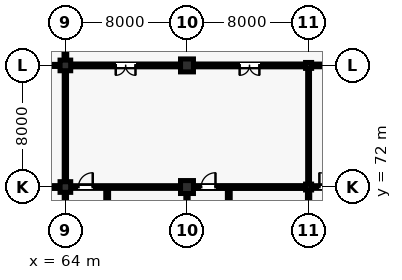
"""IFC4 building model, lengths in metres.
Left out: names, types, materials, properties, quantities, classifications, styles, units other than length and angle.
Written with IfcOpenShell. Run it as: python <this file> out.ifc"""

import sys

from ifc_helpers import new_model, si_unit, direction, frame, frame_2d, origin, origin_2d, place, context, subcontext, project, spatial, rectangle, i_section, extrude, element, fill, save


model = new_model("IFC4")
c1 = context("Model", 3, precision=1e-05, world=origin(), true_north=direction((0.0, 1.0)))
c2 = subcontext(c1, "Body", "Model", "MODEL_VIEW")
j1 = project(units=[si_unit("LENGTHUNIT", "METRE"), si_unit("PLANEANGLEUNIT", "RADIAN")], contexts=[c1])
p1 = place(None, origin())
s1 = spatial("IfcSite", under=j1, at=p1, CompositionType="ELEMENT")
p2 = place(p1, origin())
s2 = spatial("IfcBuilding", under=s1, at=p2, CompositionType="ELEMENT")
p3 = place(p2, origin())
s3 = spatial("IfcBuildingStorey", under=s2, at=p3, CompositionType="ELEMENT", Elevation=0.0)
for number, where, z_axis, x_axis in (
    (1, (64.0, 72.0, 0.0), (0.0, 0.0, 1.0), (1.0, 0.0, 0.0)),
    (2, (64.0, 80.0, 0.0), (0.0, 0.0, 1.0), (1.0, 0.0, 0.0)),
):
    element("IfcColumn", number, at=place(p3, frame(where, z_axis=z_axis, x_axis=x_axis)), inside=s3, PredefinedType="COLUMN", context=c2, shape_type="SweptSolid", body=[
        extrude(rectangle(XDim=0.7, YDim=0.7, at=origin_2d()), origin(), (0.0, 0.0, 1.0), 5.28),
    ])
for number, where, z_axis, x_axis in (
    (3, (72.0, 72.0, 0.0), (0.0, 0.0, 1.0), (1.0, 0.0, 0.0)),
    (4, (72.0, 80.0, 0.0), (0.0, 0.0, 1.0), (1.0, 0.0, 0.0)),
):
    element("IfcColumn", number, at=place(p3, frame(where, z_axis=z_axis, x_axis=x_axis)), inside=s3, PredefinedType="COLUMN", context=c2, shape_type="SweptSolid", body=[
        extrude(rectangle(XDim=0.85, YDim=0.85, at=origin_2d()), origin(), (0.0, 0.0, 1.0), 5.28),
    ])
for number, where, z_axis, x_axis in (
    (5, (80.0, 72.0, 0.0), (0.0, 0.0, 1.0), (1.0, 0.0, 0.0)),
    (6, (80.0, 80.0, 0.0), (0.0, 0.0, 1.0), (1.0, 0.0, 0.0)),
):
    element("IfcColumn", number, at=place(p3, frame(where, z_axis=z_axis, x_axis=x_axis)), inside=s3, PredefinedType="COLUMN", context=c2, shape_type="SweptSolid", body=[
        extrude(i_section(OverallWidth=0.398, OverallDepth=0.387, WebThickness=0.021, FlangeThickness=0.033, FilletRadius=0.015, at=origin_2d()), origin(), (0.0, 0.0, 1.0), 5.28),
    ])
p4 = place(p3, frame((64.0, 66.75, 0.0), z_axis=(0.0, 0.0, 1.0), x_axis=(0.0, 1.0, 0.0)))
e7 = element("IfcWall", 7, at=p4, inside=s3, PredefinedType="PARTITIONING", context=c2, shape_type="SweptSolid", body=[
    extrude(rectangle(XDim=4.89, YDim=0.15, at=frame_2d((2.445, 0.0))), origin(), (0.0, 0.0, 1.0), 4.403),
])
p5 = place(p3, frame((66.75, 66.7, 0.0), z_axis=(0.0, 0.0, 1.0), x_axis=(0.0, 1.0, 0.0)))
e8 = element("IfcWall", 8, at=p5, inside=s3, PredefinedType="PARTITIONING", context=c2, shape_type="SweptSolid", body=[
    extrude(rectangle(XDim=5.28, YDim=0.185, at=frame_2d((2.64, 0.0))), origin(), (0.0, 0.0, 1.0), 4.403),
])
p6 = place(p3, frame((72.0, 66.75, 0.0), z_axis=(0.0, 0.0, 1.0), x_axis=(0.0, 1.0, 0.0)))
e9 = element("IfcWall", 9, at=p6, inside=s3, PredefinedType="PARTITIONING", context=c2, shape_type="SweptSolid", body=[
    extrude(rectangle(XDim=4.815, YDim=0.15, at=frame_2d((2.407, 0.0))), origin(), (0.0, 0.0, 1.0), 4.412),
])
p7 = place(p3, frame((74.75, 66.7, 0.0), z_axis=(0.0, 0.0, 1.0), x_axis=(0.0, 1.0, 0.0)))
e10 = element("IfcWall", 10, at=p7, inside=s3, PredefinedType="PARTITIONING", context=c2, shape_type="SweptSolid", body=[
    extrude(rectangle(XDim=5.28, YDim=0.185, at=frame_2d((2.64, 0.0))), origin(), (0.0, 0.0, 1.0), 4.336),
])
p8 = place(p3, frame((80.0, 66.75, 0.0), z_axis=(0.0, 0.0, 1.0), x_axis=(0.0, 1.0, 0.0)))
e11 = element("IfcWall", 11, at=p8, inside=s3, PredefinedType="PARTITIONING", context=c2, shape_type="SweptSolid", body=[
    extrude(rectangle(XDim=5.046, YDim=0.15, at=frame_2d((2.523, 0.0))), origin(), (0.0, 0.0, 1.0), 4.404),
])
p9 = place(p3, frame((56.34, 72.0, 0.0), z_axis=(0.0, 0.0, 1.0), x_axis=(1.0, 0.0, 0.0)))
e12 = element("IfcWall", 12, at=p9, inside=s3, PredefinedType="PARTITIONING", context=c2, shape_type="SweptSolid", body=[
    extrude(rectangle(XDim=7.32, YDim=0.185, at=frame_2d((3.66, 0.0))), origin(), (0.0, 0.0, 1.0), 4.327),
])
p10 = place(p9, frame((0.52, 0.0, 0.0)))
e13 = element("IfcOpeningElement", 13, at=p10, cuts=e12, PredefinedType="OPENING", context=c2, shape_type="SweptSolid", body=[
    extrude(rectangle(XDim=0.94, YDim=2.12, at=frame_2d((0.47, 1.06))), frame((0.0, 0.103, 0.0), z_axis=(0.0, -1.0, 0.0), x_axis=(1.0, 0.0, 0.0)), (0.0, 0.0, 1.0), 0.205),
])
p11 = place(p3, frame((64.0, 72.34, 0.0), z_axis=(0.0, 0.0, 1.0), x_axis=(0.0, 1.0, 0.0)))
e14 = element("IfcWall", 14, at=p11, inside=s3, PredefinedType="PARTITIONING", context=c2, shape_type="SweptSolid", body=[
    extrude(rectangle(XDim=7.32, YDim=0.15, at=frame_2d((3.66, 0.0))), origin(), (0.0, 0.0, 1.0), 4.412),
])
p12 = place(p3, frame((56.0, 80.0, 0.0), z_axis=(0.0, 0.0, 1.0), x_axis=(1.0, 0.0, 0.0)))
e15 = element("IfcWall", 15, at=p12, inside=s3, PredefinedType="PARTITIONING", context=c2, shape_type="SweptSolid", body=[
    extrude(rectangle(XDim=7.66, YDim=0.135, at=frame_2d((3.83, 0.0))), origin(), (0.0, 0.0, 1.0), 5.025),
])
p13 = place(p3, frame((64.0, 80.34, 0.0), z_axis=(0.0, 0.0, 1.0), x_axis=(0.0, 1.0, 0.0)))
e16 = element("IfcWall", 16, at=p13, inside=s3, PredefinedType="PARTITIONING", context=c2, shape_type="SweptSolid", body=[
    extrude(rectangle(XDim=7.66, YDim=0.175, at=frame_2d((3.83, 0.0))), origin(), (0.0, 0.0, 1.0), 5.025),
])
p14 = place(p13, frame((3.305, 0.0, 0.0)))
e17 = element("IfcOpeningElement", 17, at=p14, cuts=e16, PredefinedType="OPENING", context=c2, shape_type="SweptSolid", body=[
    extrude(rectangle(XDim=1.05, YDim=2.15, at=frame_2d((0.525, 1.075))), frame((0.0, 0.097, 0.0), z_axis=(0.0, -1.0, 0.0), x_axis=(1.0, 0.0, 0.0)), (0.0, 0.0, 1.0), 0.195),
])
p15 = place(p3, frame((64.34, 72.0, 0.0), z_axis=(0.0, 0.0, 1.0), x_axis=(1.0, 0.0, 0.0)))
e18 = element("IfcWall", 18, at=p15, inside=s3, PredefinedType="PARTITIONING", context=c2, shape_type="SweptSolid", body=[
    extrude(rectangle(XDim=7.245, YDim=0.175, at=frame_2d((3.623, 0.0))), origin(), (0.0, 0.0, 1.0), 4.403),
])
p16 = place(p15, frame((0.52, 0.0, 0.0)))
e19 = element("IfcOpeningElement", 19, at=p16, cuts=e18, PredefinedType="OPENING", context=c2, shape_type="SweptSolid", body=[
    extrude(rectangle(XDim=0.94, YDim=2.12, at=frame_2d((0.47, 1.06))), frame((0.0, 0.097, 0.0), z_axis=(0.0, -1.0, 0.0), x_axis=(1.0, 0.0, 0.0)), (0.0, 0.0, 1.0), 0.195),
])
p17 = place(p3, frame((64.34, 80.0, 0.0), z_axis=(0.0, 0.0, 1.0), x_axis=(1.0, 0.0, 0.0)))
e20 = element("IfcWall", 20, at=p17, inside=s3, PredefinedType="PARTITIONING", context=c2, shape_type="SweptSolid", body=[
    extrude(rectangle(XDim=7.245, YDim=0.185, at=frame_2d((3.623, 0.0))), origin(), (0.0, 0.0, 1.0), 4.336),
])
p18 = place(p17, frame((2.972, 0.0, 0.0)))
e21 = element("IfcOpeningElement", 21, at=p18, cuts=e20, PredefinedType="OPENING", context=c2, shape_type="SweptSolid", body=[
    extrude(rectangle(XDim=1.3, YDim=2.2, at=frame_2d((0.65, 1.1))), frame((0.0, 0.103, 0.0), z_axis=(0.0, -1.0, 0.0), x_axis=(1.0, 0.0, 0.0)), (0.0, 0.0, 1.0), 0.205),
])
p19 = place(p3, frame((72.415, 72.0, 0.0), z_axis=(0.0, 0.0, 1.0), x_axis=(1.0, 0.0, 0.0)))
e22 = element("IfcWall", 22, at=p19, inside=s3, PredefinedType="PARTITIONING", context=c2, shape_type="SweptSolid", body=[
    extrude(rectangle(XDim=7.396, YDim=0.185, at=frame_2d((3.698, 0.0))), origin(), (0.0, 0.0, 1.0), 4.336),
])
p20 = place(p19, frame((0.52, 0.0, 0.0)))
e23 = element("IfcOpeningElement", 23, at=p20, cuts=e22, PredefinedType="OPENING", context=c2, shape_type="SweptSolid", body=[
    extrude(rectangle(XDim=0.94, YDim=2.12, at=frame_2d((0.47, 1.06))), frame((0.0, 0.103, 0.0), z_axis=(0.0, -1.0, 0.0), x_axis=(1.0, 0.0, 0.0)), (0.0, 0.0, 1.0), 0.205),
])
p21 = place(p3, frame((80.0, 72.184, 0.0), z_axis=(0.0, 0.0, 1.0), x_axis=(0.0, 1.0, 0.0)))
e24 = element("IfcWall", 24, at=p21, inside=s3, PredefinedType="PARTITIONING", context=c2, shape_type="SweptSolid", body=[
    extrude(rectangle(XDim=7.633, YDim=0.12, at=frame_2d((3.816, 0.0))), origin(), (0.0, 0.0, 1.0), 4.471),
])
p22 = place(p3, frame((72.415, 80.0, 0.0), z_axis=(0.0, 0.0, 1.0), x_axis=(1.0, 0.0, 0.0)))
e25 = element("IfcWall", 25, at=p22, inside=s3, PredefinedType="PARTITIONING", context=c2, shape_type="SweptSolid", body=[
    extrude(rectangle(XDim=7.396, YDim=0.185, at=frame_2d((3.698, 0.0))), origin(), (0.0, 0.0, 1.0), 4.404),
])
p23 = place(p22, frame((3.048, 0.0, 0.0)))
e26 = element("IfcOpeningElement", 26, at=p23, cuts=e25, PredefinedType="OPENING", context=c2, shape_type="SweptSolid", body=[
    extrude(rectangle(XDim=1.3, YDim=2.2, at=frame_2d((0.65, 1.1))), frame((0.0, 0.103, 0.0), z_axis=(0.0, -1.0, 0.0), x_axis=(1.0, 0.0, 0.0)), (0.0, 0.0, 1.0), 0.205),
])
p24 = place(p3, frame((80.189, 72.0, 0.0), z_axis=(0.0, 0.0, 1.0), x_axis=(1.0, 0.0, 0.0)))
e27 = element("IfcWall", 27, at=p24, inside=s3, PredefinedType="PARTITIONING", context=c2, shape_type="SweptSolid", body=[
    extrude(rectangle(XDim=7.811, YDim=0.175, at=frame_2d((3.906, 0.0))), origin(), (0.0, 0.0, 1.0), 4.262),
])
p25 = place(p24, frame((0.52, 0.0, 0.0)))
e28 = element("IfcOpeningElement", 28, at=p25, cuts=e27, PredefinedType="OPENING", context=c2, shape_type="SweptSolid", body=[
    extrude(rectangle(XDim=0.94, YDim=2.12, at=frame_2d((0.47, 1.06))), frame((0.0, 0.097, 0.0), z_axis=(0.0, -1.0, 0.0), x_axis=(1.0, 0.0, 0.0)), (0.0, 0.0, 1.0), 0.195),
])
p26 = place(p3, frame((80.189, 80.0, 0.0), z_axis=(0.0, 0.0, 1.0), x_axis=(1.0, 0.0, 0.0)))
e29 = element("IfcWall", 29, at=p26, inside=s3, PredefinedType="PARTITIONING", context=c2, shape_type="SweptSolid", body=[
    extrude(rectangle(XDim=7.471, YDim=0.175, at=frame_2d((3.735, 0.0))), origin(), (0.0, 0.0, 1.0), 4.327),
])
p27 = place(p16, origin())
e30 = element("IfcDoor", 30, at=p27, inside=s3, OperationType="SINGLE_SWING_RIGHT", PredefinedType="DOOR", context=c2, shape_type="SweptSolid", body=[
    extrude(rectangle(XDim=0.94, YDim=2.12, at=frame_2d((0.47, 1.06))), frame((0.0, 0.025, 0.0), z_axis=(0.0, -1.0, 0.0), x_axis=(1.0, 0.0, 0.0)), (0.0, 0.0, 1.0), 0.05),
])
fill(e19, e30)
p28 = place(p18, frame((1.3, 0.0, 0.0), z_axis=(0.0, 0.0, 1.0), x_axis=(-1.0, 0.0, 0.0)))
e31 = element("IfcDoor", 31, at=p28, inside=s3, OperationType="DOUBLE_DOOR_SINGLE_SWING", PredefinedType="DOOR", context=c2, shape_type="SweptSolid", body=[
    extrude(rectangle(XDim=1.3, YDim=2.2, at=frame_2d((0.65, 1.1))), frame((0.0, 0.025, 0.0), z_axis=(0.0, -1.0, 0.0), x_axis=(1.0, 0.0, 0.0)), (0.0, 0.0, 1.0), 0.05),
])
fill(e21, e31)
p29 = place(p20, origin())
e32 = element("IfcDoor", 32, at=p29, inside=s3, OperationType="SINGLE_SWING_RIGHT", PredefinedType="DOOR", context=c2, shape_type="SweptSolid", body=[
    extrude(rectangle(XDim=0.94, YDim=2.12, at=frame_2d((0.47, 1.06))), frame((0.0, 0.025, 0.0), z_axis=(0.0, -1.0, 0.0), x_axis=(1.0, 0.0, 0.0)), (0.0, 0.0, 1.0), 0.05),
])
fill(e23, e32)
p30 = place(p23, frame((1.3, 0.0, 0.0), z_axis=(0.0, 0.0, 1.0), x_axis=(-1.0, 0.0, 0.0)))
e33 = element("IfcDoor", 33, at=p30, inside=s3, OperationType="DOUBLE_DOOR_SINGLE_SWING", PredefinedType="DOOR", context=c2, shape_type="SweptSolid", body=[
    extrude(rectangle(XDim=1.3, YDim=2.2, at=frame_2d((0.65, 1.1))), frame((0.0, 0.025, 0.0), z_axis=(0.0, -1.0, 0.0), x_axis=(1.0, 0.0, 0.0)), (0.0, 0.0, 1.0), 0.05),
])
fill(e26, e33)
p31 = place(p25, origin())
e34 = element("IfcDoor", 34, at=p31, inside=s3, OperationType="SINGLE_SWING_LEFT", PredefinedType="DOOR", context=c2, shape_type="SweptSolid", body=[
    extrude(rectangle(XDim=0.94, YDim=2.12, at=frame_2d((0.47, 1.06))), frame((0.0, 0.025, 0.0), z_axis=(0.0, -1.0, 0.0), x_axis=(1.0, 0.0, 0.0)), (0.0, 0.0, 1.0), 0.05),
])
fill(e28, e34)
save(model, sys.argv[1])
